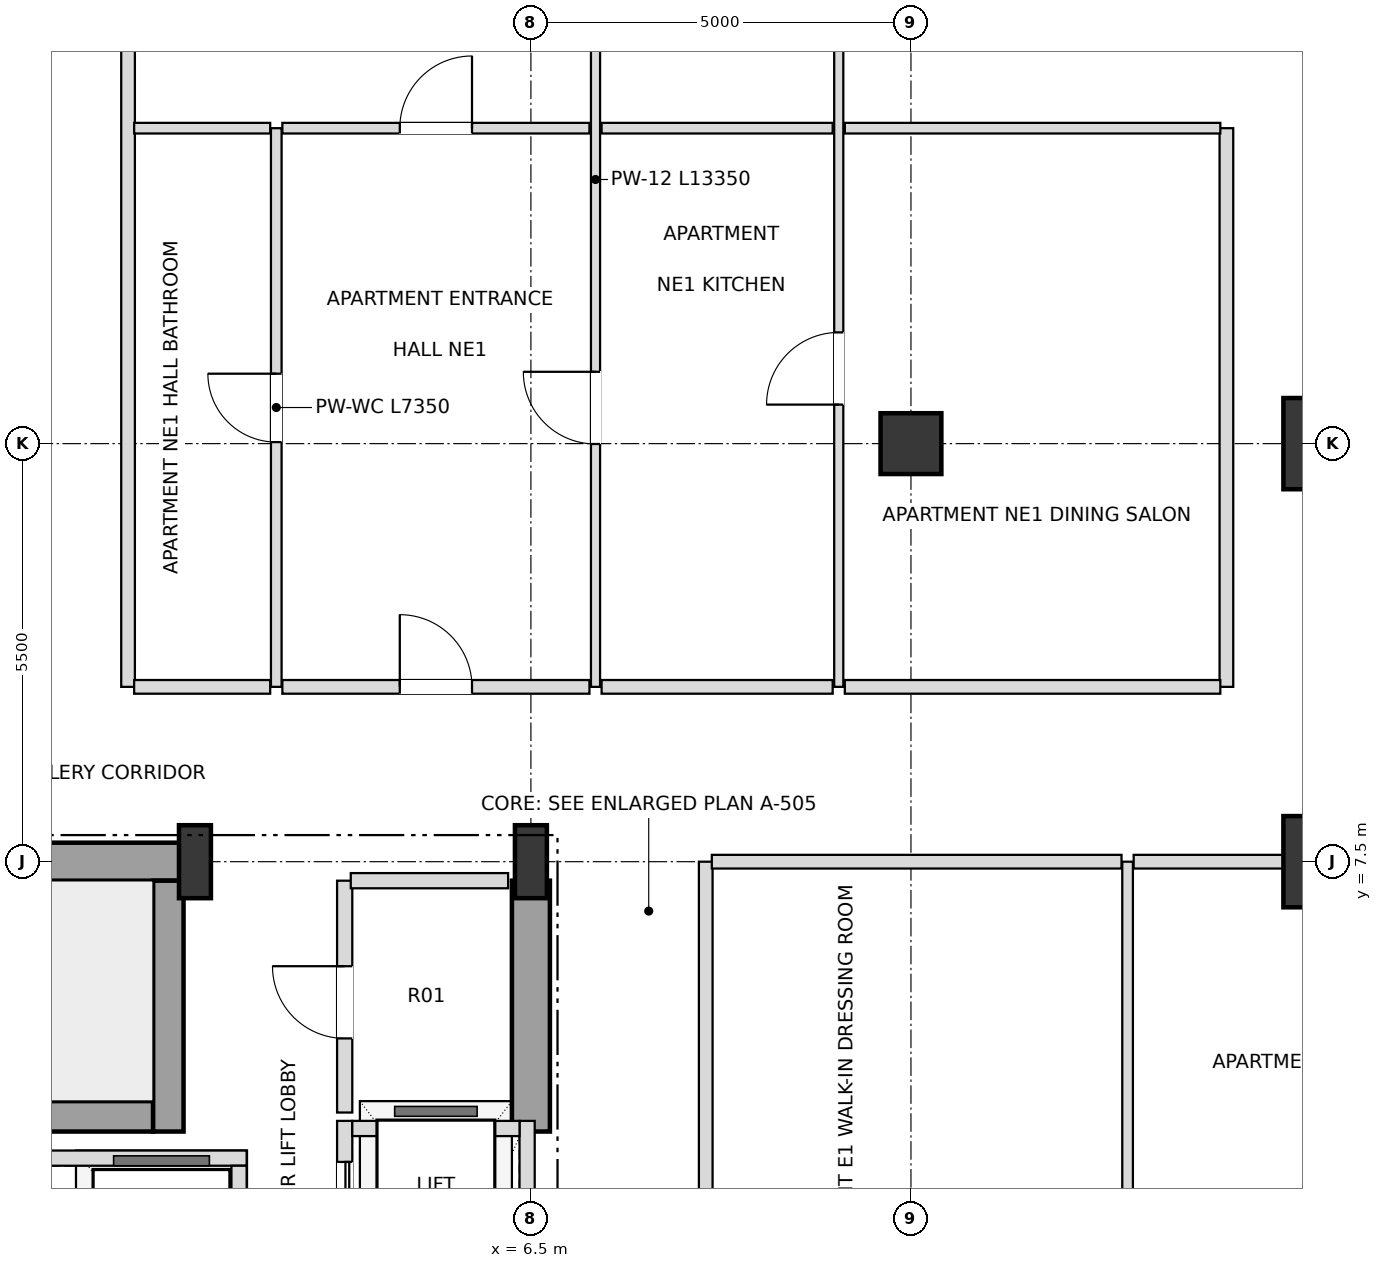
"""IFC4 building model, lengths in metres.
Left out: names, types, materials, properties, quantities, classifications, styles, units other than length and angle.
Written with IfcOpenShell. Run it as: python <this file> out.ifc"""

import sys

from ifc_helpers import new_model, si_unit, direction, frame, frame_2d, origin, origin_2d, place, context, subcontext, project, spatial, rectangle, i_section, extrude, element, fill, save


model = new_model("IFC4")
c1 = context("Model", 3, precision=1e-05, world=origin(), true_north=direction((0.0, 1.0)))
c2 = subcontext(c1, "Body", "Model", "MODEL_VIEW")
j1 = project(units=[si_unit("LENGTHUNIT", "METRE"), si_unit("PLANEANGLEUNIT", "RADIAN")], contexts=[c1])
p1 = place(None, origin())
s1 = spatial("IfcSite", under=j1, at=p1, CompositionType="ELEMENT")
p2 = place(p1, origin())
s2 = spatial("IfcBuilding", under=s1, at=p2, CompositionType="ELEMENT")
p3 = place(p2, frame((0.0, 0.0, 154.8)))
s3 = spatial("IfcBuildingStorey", under=s2, at=p3, CompositionType="ELEMENT", Elevation=154.8)
for number, where, z_axis, x_axis in (
    (1, (2.08, 7.5, 0.0), (0.0, 0.0, 1.0), (1.0, 0.0, 0.0)),
    (2, (6.5, 7.5, 0.0), (0.0, 0.0, 1.0), (1.0, 0.0, 0.0)),
):
    element("IfcColumn", number, at=place(p3, frame(where, z_axis=z_axis, x_axis=x_axis)), inside=s3, PredefinedType="COLUMN", context=c2, shape_type="SweptSolid", body=[
        extrude(i_section(OverallWidth=0.42, OverallDepth=0.96, WebThickness=0.022, FlangeThickness=0.034, at=origin_2d()), origin(), (0.0, 0.0, 1.0), 3.6),
    ])
for number, where, z_axis, x_axis in (
    (3, (17.0, 7.5, 0.0), (0.0, 0.0, 1.0), (1.0, 0.0, 0.0)),
    (4, (17.0, 13.0, 0.0), (0.0, 0.0, 1.0), (1.0, 0.0, 0.0)),
):
    element("IfcColumn", number, at=place(p3, frame(where, z_axis=z_axis, x_axis=x_axis)), inside=s3, PredefinedType="USERDEFINED", context=c2, shape_type="SweptSolid", body=[
        extrude(rectangle(XDim=1.2, YDim=1.2, at=origin_2d()), origin(), (0.0, 0.0, 1.0), 3.6),
    ])
p4 = place(p3, frame((11.5, 13.0, 0.0), z_axis=(0.0, 0.0, 1.0), x_axis=(1.0, 0.0, 0.0)))
e5 = element("IfcColumn", 5, at=p4, inside=s3, PredefinedType="COLUMN", context=c2, shape_type="SweptSolid", body=[
    extrude(rectangle(XDim=0.8, YDim=0.8, at=origin_2d()), origin(), (0.0, 0.0, 1.0), 3.6),
])
p5 = place(p3, frame((0.0, 7.5, 0.0), z_axis=(0.0, 0.0, 1.0), x_axis=(1.0, 0.0, 0.0)))
e6 = element("IfcWall", 6, at=p5, inside=s3, PredefinedType="SHEAR", context=c2, shape_type="SweptSolid", body=[
    extrude(rectangle(XDim=2.08, YDim=0.5, at=frame_2d((1.04, 0.0))), origin(), (0.0, 0.0, 1.0), 3.38),
])
p6 = place(p3, frame((6.5, 3.95, 0.0), z_axis=(0.0, 0.0, 1.0), x_axis=(0.0, 1.0, 0.0)))
e7 = element("IfcWall", 7, at=p6, inside=s3, PredefinedType="SHEAR", context=c2, shape_type="SweptSolid", body=[
    extrude(rectangle(XDim=3.3, YDim=0.5, at=frame_2d((1.65, 0.0))), origin(), (0.0, 0.0, 1.0), 3.38),
])
p7 = place(p3, frame((-5.55, 4.15, 0.0), z_axis=(0.0, 0.0, 1.0), x_axis=(1.0, 0.0, 0.0)))
e8 = element("IfcWall", 8, at=p7, inside=s3, PredefinedType="SHEAR", context=c2, shape_type="SweptSolid", body=[
    extrude(rectangle(XDim=7.08, YDim=0.4, at=frame_2d((3.54, 0.0))), origin(), (0.0, 0.0, 1.0), 3.38),
])
p8 = place(p3, frame((1.73, 3.95, 0.0), z_axis=(0.0, 0.0, 1.0), x_axis=(0.0, 1.0, 0.0)))
e9 = element("IfcWall", 9, at=p8, inside=s3, PredefinedType="SHEAR", context=c2, shape_type="SweptSolid", body=[
    extrude(rectangle(XDim=3.3, YDim=0.4, at=frame_2d((1.65, 0.0))), origin(), (0.0, 0.0, 1.0), 3.38),
])
p9 = place(p3, frame((4.05, -1.49, 0.0), z_axis=(0.0, 0.0, 1.0), x_axis=(0.0, 1.0, 0.0)))
e10 = element("IfcWall", 10, at=p9, inside=s3, PredefinedType="SOLIDWALL", context=c2, shape_type="SweptSolid", body=[
    extrude(rectangle(XDim=5.58, YDim=0.2, at=frame_2d((2.79, 0.0))), origin(), (0.0, 0.0, 1.0), 3.38),
])
p10 = place(p9, frame((0.54, 0.0, 0.0)))
e11 = element("IfcOpeningElement", 11, at=p10, cuts=e10, PredefinedType="OPENING", context=c2, shape_type="SweptSolid", body=[
    extrude(rectangle(XDim=1.1, YDim=2.15, at=frame_2d((0.55, 1.075))), frame((0.0, 0.11, 0.0), z_axis=(0.0, -1.0, 0.0), x_axis=(1.0, 0.0, 0.0)), (0.0, 0.0, 1.0), 0.22),
])
p11 = place(p9, frame((2.24, 0.0, 0.0)))
e12 = element("IfcOpeningElement", 12, at=p11, cuts=e10, PredefinedType="OPENING", context=c2, shape_type="SweptSolid", body=[
    extrude(rectangle(XDim=1.1, YDim=2.15, at=frame_2d((0.55, 1.075))), frame((0.0, 0.11, 0.0), z_axis=(0.0, -1.0, 0.0), x_axis=(1.0, 0.0, 0.0)), (0.0, 0.0, 1.0), 0.22),
])
p12 = place(p9, frame((3.94, 0.0, 0.0)))
e13 = element("IfcOpeningElement", 13, at=p12, cuts=e10, PredefinedType="OPENING", context=c2, shape_type="SweptSolid", body=[
    extrude(rectangle(XDim=1.1, YDim=2.15, at=frame_2d((0.55, 1.075))), frame((0.0, 0.11, 0.0), z_axis=(0.0, -1.0, 0.0), x_axis=(1.0, 0.0, 0.0)), (0.0, 0.0, 1.0), 0.22),
])
p13 = place(p3, frame((6.45, -1.49, 0.0), z_axis=(0.0, 0.0, 1.0), x_axis=(0.0, 1.0, 0.0)))
e14 = element("IfcWall", 14, at=p13, inside=s3, PredefinedType="SOLIDWALL", context=c2, shape_type="SweptSolid", body=[
    extrude(rectangle(XDim=5.58, YDim=0.2, at=frame_2d((2.79, 0.0))), origin(), (0.0, 0.0, 1.0), 2.816),
])
p14 = place(p3, frame((4.15, 3.99, 0.0), z_axis=(0.0, 0.0, 1.0), x_axis=(1.0, 0.0, 0.0)))
e15 = element("IfcWall", 15, at=p14, inside=s3, PredefinedType="SOLIDWALL", context=c2, shape_type="SweptSolid", body=[
    extrude(rectangle(XDim=2.2, YDim=0.2, at=frame_2d((1.1, 0.0))), origin(), (0.0, 0.0, 1.0), 3.38),
])
p15 = place(p3, frame((-2.82, 3.6, 0.0), z_axis=(0.0, 0.0, 1.0), x_axis=(1.0, 0.0, 0.0)))
e16 = element("IfcWall", 16, at=p15, inside=s3, PredefinedType="SOLIDWALL", context=c2, shape_type="SweptSolid", body=[
    extrude(rectangle(XDim=5.58, YDim=0.2, at=frame_2d((2.79, 0.0))), origin(), (0.0, 0.0, 1.0), 3.38),
])
p16 = place(p3, frame((2.66, 1.0, 0.0), z_axis=(0.0, 0.0, 1.0), x_axis=(0.0, 1.0, 0.0)))
e17 = element("IfcWall", 17, at=p16, inside=s3, PredefinedType="SOLIDWALL", context=c2, shape_type="SweptSolid", body=[
    extrude(rectangle(XDim=2.5, YDim=0.2, at=frame_2d((1.25, 0.0))), origin(), (0.0, 0.0, 1.0), 3.38),
])
p17 = place(p3, frame((1.2, 9.8, 0.0), z_axis=(0.0, 0.0, 1.0), x_axis=(0.0, 1.0, 0.0)))
e18 = element("IfcWall", 18, at=p17, inside=s3, PredefinedType="PARTITIONING", context=c2, shape_type="SweptSolid", body=[
    extrude(rectangle(XDim=13.35, YDim=0.18, at=frame_2d((6.675, 0.0))), origin(), (0.0, 0.0, 1.0), 2.816),
])
p18 = place(p3, frame((3.15, 9.8, 0.0), z_axis=(0.0, 0.0, 1.0), x_axis=(0.0, 1.0, 0.0)))
e19 = element("IfcWall", 19, at=p18, inside=s3, PredefinedType="PARTITIONING", context=c2, shape_type="SweptSolid", body=[
    extrude(rectangle(XDim=7.35, YDim=0.14, at=frame_2d((3.675, 0.0))), origin(), (0.0, 0.0, 1.0), 3.38),
])
p19 = place(p18, frame((3.22, 0.0, 0.0)))
e20 = element("IfcOpeningElement", 20, at=p19, cuts=e19, PredefinedType="OPENING", context=c2, shape_type="SweptSolid", body=[
    extrude(rectangle(XDim=0.9, YDim=2.1, at=frame_2d((0.45, 1.05))), frame((0.0, 0.08, 0.0), z_axis=(0.0, -1.0, 0.0), x_axis=(1.0, 0.0, 0.0)), (0.0, 0.0, 1.0), 0.16),
])
p20 = place(p3, frame((4.05, 4.2, 0.0), z_axis=(0.0, 0.0, 1.0), x_axis=(0.0, 1.0, 0.0)))
e21 = element("IfcWall", 21, at=p20, inside=s3, PredefinedType="SOLIDWALL", context=c2, shape_type="SweptSolid", body=[
    extrude(rectangle(XDim=3.05, YDim=0.2, at=frame_2d((1.525, 0.0))), origin(), (0.0, 0.0, 1.0), 3.38),
])
p21 = place(p20, frame((0.975, 0.0, 0.0)))
e22 = element("IfcOpeningElement", 22, at=p21, cuts=e21, PredefinedType="OPENING", context=c2, shape_type="SweptSolid", body=[
    extrude(rectangle(XDim=0.95, YDim=2.15, at=frame_2d((0.475, 1.075))), frame((0.0, 0.11, 0.0), z_axis=(0.0, -1.0, 0.0), x_axis=(1.0, 0.0, 0.0)), (0.0, 0.0, 1.0), 0.22),
])
p22 = place(p3, frame((7.35, 9.8, 0.0), z_axis=(0.0, 0.0, 1.0), x_axis=(0.0, 1.0, 0.0)))
e23 = element("IfcWall", 23, at=p22, inside=s3, PredefinedType="PARTITIONING", context=c2, shape_type="SweptSolid", body=[
    extrude(rectangle(XDim=13.35, YDim=0.12, at=frame_2d((6.675, 0.0))), origin(), (0.0, 0.0, 1.0), 2.816),
])
p23 = place(p22, frame((3.195, 0.0, 0.0)))
e24 = element("IfcOpeningElement", 24, at=p23, cuts=e23, PredefinedType="OPENING", context=c2, shape_type="SweptSolid", body=[
    extrude(rectangle(XDim=0.95, YDim=2.1, at=frame_2d((0.475, 1.05))), frame((0.0, 0.07, 0.0), z_axis=(0.0, -1.0, 0.0), x_axis=(1.0, 0.0, 0.0)), (0.0, 0.0, 1.0), 0.14),
])
p24 = place(p22, frame((11.051, 0.0, 0.0)))
e25 = element("IfcOpeningElement", 25, at=p24, cuts=e23, PredefinedType="OPENING", context=c2, shape_type="SweptSolid", body=[
    extrude(rectangle(XDim=0.9, YDim=2.1, at=frame_2d((0.45, 1.05))), frame((0.0, 0.07, 0.0), z_axis=(0.0, -1.0, 0.0), x_axis=(1.0, 0.0, 0.0)), (0.0, 0.0, 1.0), 0.14),
])
p25 = place(p3, frame((8.8, -7.5, 0.0), z_axis=(0.0, 0.0, 1.0), x_axis=(0.0, 1.0, 0.0)))
e26 = element("IfcWall", 26, at=p25, inside=s3, PredefinedType="PARTITIONING", context=c2, shape_type="SweptSolid", body=[
    extrude(rectangle(XDim=15.0, YDim=0.18, at=frame_2d((7.5, 0.0))), origin(), (0.0, 0.0, 1.0), 3.38),
])
p26 = place(p25, frame((3.475, 0.0, 0.0)))
e27 = element("IfcOpeningElement", 27, at=p26, cuts=e26, PredefinedType="OPENING", context=c2, shape_type="SweptSolid", body=[
    extrude(rectangle(XDim=0.95, YDim=2.15, at=frame_2d((0.475, 1.075))), frame((0.0, 0.1, 0.0), z_axis=(0.0, -1.0, 0.0), x_axis=(1.0, 0.0, 0.0)), (0.0, 0.0, 1.0), 0.2),
])
p27 = place(p3, frame((10.55, 9.8, 0.0), z_axis=(0.0, 0.0, 1.0), x_axis=(0.0, 1.0, 0.0)))
e28 = element("IfcWall", 28, at=p27, inside=s3, PredefinedType="PARTITIONING", context=c2, shape_type="SweptSolid", body=[
    extrude(rectangle(XDim=13.35, YDim=0.12, at=frame_2d((6.675, 0.0))), origin(), (0.0, 0.0, 1.0), 2.816),
])
p28 = place(p27, frame((3.713, 0.0, 0.0)))
e29 = element("IfcOpeningElement", 29, at=p28, cuts=e28, PredefinedType="OPENING", context=c2, shape_type="SweptSolid", body=[
    extrude(rectangle(XDim=0.95, YDim=2.1, at=frame_2d((0.475, 1.05))), frame((0.0, 0.07, 0.0), z_axis=(0.0, -1.0, 0.0), x_axis=(1.0, 0.0, 0.0)), (0.0, 0.0, 1.0), 0.14),
])
p29 = place(p27, frame((11.051, 0.0, 0.0)))
e30 = element("IfcOpeningElement", 30, at=p29, cuts=e28, PredefinedType="OPENING", context=c2, shape_type="SweptSolid", body=[
    extrude(rectangle(XDim=0.9, YDim=2.1, at=frame_2d((0.45, 1.05))), frame((0.0, 0.07, 0.0), z_axis=(0.0, -1.0, 0.0), x_axis=(1.0, 0.0, 0.0)), (0.0, 0.0, 1.0), 0.14),
])
p30 = place(p3, frame((14.35, -7.5, 0.0), z_axis=(0.0, 0.0, 1.0), x_axis=(0.0, 1.0, 0.0)))
e31 = element("IfcWall", 31, at=p30, inside=s3, PredefinedType="PARTITIONING", context=c2, shape_type="SweptSolid", body=[
    extrude(rectangle(XDim=15.0, YDim=0.14, at=frame_2d((7.5, 0.0))), origin(), (0.0, 0.0, 1.0), 3.38),
])
p31 = place(p30, frame((3.475, 0.0, 0.0)))
e32 = element("IfcOpeningElement", 32, at=p31, cuts=e31, PredefinedType="OPENING", context=c2, shape_type="SweptSolid", body=[
    extrude(rectangle(XDim=0.95, YDim=2.1, at=frame_2d((0.475, 1.05))), frame((0.0, 0.08, 0.0), z_axis=(0.0, -1.0, 0.0), x_axis=(1.0, 0.0, 0.0)), (0.0, 0.0, 1.0), 0.16),
])
p32 = place(p3, frame((15.65, 9.8, 0.0), z_axis=(0.0, 0.0, 1.0), x_axis=(0.0, 1.0, 0.0)))
e33 = element("IfcWall", 33, at=p32, inside=s3, PredefinedType="PARTITIONING", context=c2, shape_type="SweptSolid", body=[
    extrude(rectangle(XDim=7.35, YDim=0.18, at=frame_2d((3.675, 0.0))), origin(), (0.0, 0.0, 1.0), 2.736),
])
p33 = place(p3, frame((4.13, 7.25, 0.0), z_axis=(0.0, 0.0, 1.0), x_axis=(1.0, 0.0, 0.0)))
e34 = element("IfcWall", 34, at=p33, inside=s3, PredefinedType="SOLIDWALL", context=c2, shape_type="SweptSolid", body=[
    extrude(rectangle(XDim=2.07, YDim=0.2, at=frame_2d((1.035, 0.0))), origin(), (0.0, 0.0, 1.0), 3.38),
])
p34 = place(p3, frame((8.88, 7.5, 0.0), z_axis=(0.0, 0.0, 1.0), x_axis=(1.0, 0.0, 0.0)))
e35 = element("IfcWall", 35, at=p34, inside=s3, PredefinedType="PARTITIONING", context=c2, shape_type="SweptSolid", body=[
    extrude(rectangle(XDim=5.39, YDim=0.18, at=frame_2d((2.695, 0.0))), origin(), (0.0, 0.0, 1.0), 2.816),
])
p35 = place(p3, frame((14.43, 7.5, 0.0), z_axis=(0.0, 0.0, 1.0), x_axis=(1.0, 0.0, 0.0)))
e36 = element("IfcWall", 36, at=p35, inside=s3, PredefinedType="PARTITIONING", context=c2, shape_type="SweptSolid", body=[
    extrude(rectangle(XDim=5.72, YDim=0.18, at=frame_2d((2.86, 0.0))), origin(), (0.0, 0.0, 1.0), 2.816),
])
p36 = place(p3, frame((1.28, 9.8, 0.0), z_axis=(0.0, 0.0, 1.0), x_axis=(1.0, 0.0, 0.0)))
e37 = element("IfcWall", 37, at=p36, inside=s3, PredefinedType="PARTITIONING", context=c2, shape_type="SweptSolid", body=[
    extrude(rectangle(XDim=1.79, YDim=0.18, at=frame_2d((0.895, 0.0))), origin(), (0.0, 0.0, 1.0), 3.38),
])
p37 = place(p3, frame((3.23, 9.8, 0.0), z_axis=(0.0, 0.0, 1.0), x_axis=(1.0, 0.0, 0.0)))
e38 = element("IfcWall", 38, at=p37, inside=s3, PredefinedType="PARTITIONING", context=c2, shape_type="SweptSolid", body=[
    extrude(rectangle(XDim=4.04, YDim=0.18, at=frame_2d((2.02, 0.0))), origin(), (0.0, 0.0, 1.0), 2.816),
])
p38 = place(p37, frame((1.545, 0.0, 0.0)))
e39 = element("IfcOpeningElement", 39, at=p38, cuts=e38, PredefinedType="OPENING", context=c2, shape_type="SweptSolid", body=[
    extrude(rectangle(XDim=0.95, YDim=2.15, at=frame_2d((0.475, 1.075))), frame((0.0, 0.1, 0.0), z_axis=(0.0, -1.0, 0.0), x_axis=(1.0, 0.0, 0.0)), (0.0, 0.0, 1.0), 0.2),
])
p39 = place(p3, frame((7.43, 9.8, 0.0), z_axis=(0.0, 0.0, 1.0), x_axis=(1.0, 0.0, 0.0)))
e40 = element("IfcWall", 40, at=p39, inside=s3, PredefinedType="PARTITIONING", context=c2, shape_type="SweptSolid", body=[
    extrude(rectangle(XDim=3.04, YDim=0.18, at=frame_2d((1.52, 0.0))), origin(), (0.0, 0.0, 1.0), 3.38),
])
p40 = place(p3, frame((10.63, 9.8, 0.0), z_axis=(0.0, 0.0, 1.0), x_axis=(1.0, 0.0, 0.0)))
e41 = element("IfcWall", 41, at=p40, inside=s3, PredefinedType="PARTITIONING", context=c2, shape_type="SweptSolid", body=[
    extrude(rectangle(XDim=4.94, YDim=0.18, at=frame_2d((2.47, 0.0))), origin(), (0.0, 0.0, 1.0), 3.38),
])
p41 = place(p3, frame((1.28, 17.15, 0.0), z_axis=(0.0, 0.0, 1.0), x_axis=(1.0, 0.0, 0.0)))
e42 = element("IfcWall", 42, at=p41, inside=s3, PredefinedType="PARTITIONING", context=c2, shape_type="SweptSolid", body=[
    extrude(rectangle(XDim=1.79, YDim=0.14, at=frame_2d((0.895, 0.0))), origin(), (0.0, 0.0, 1.0), 3.38),
])
p42 = place(p3, frame((3.23, 17.15, 0.0), z_axis=(0.0, 0.0, 1.0), x_axis=(1.0, 0.0, 0.0)))
e43 = element("IfcWall", 43, at=p42, inside=s3, PredefinedType="PARTITIONING", context=c2, shape_type="SweptSolid", body=[
    extrude(rectangle(XDim=4.04, YDim=0.14, at=frame_2d((2.02, 0.0))), origin(), (0.0, 0.0, 1.0), 2.816),
])
p43 = place(p42, frame((1.545, 0.0, 0.0)))
e44 = element("IfcOpeningElement", 44, at=p43, cuts=e43, PredefinedType="OPENING", context=c2, shape_type="SweptSolid", body=[
    extrude(rectangle(XDim=0.95, YDim=2.1, at=frame_2d((0.475, 1.05))), frame((0.0, 0.08, 0.0), z_axis=(0.0, -1.0, 0.0), x_axis=(1.0, 0.0, 0.0)), (0.0, 0.0, 1.0), 0.16),
])
p44 = place(p3, frame((7.43, 17.15, 0.0), z_axis=(0.0, 0.0, 1.0), x_axis=(1.0, 0.0, 0.0)))
e45 = element("IfcWall", 45, at=p44, inside=s3, PredefinedType="PARTITIONING", context=c2, shape_type="SweptSolid", body=[
    extrude(rectangle(XDim=3.04, YDim=0.14, at=frame_2d((1.52, 0.0))), origin(), (0.0, 0.0, 1.0), 3.38),
])
p45 = place(p3, frame((10.63, 17.15, 0.0), z_axis=(0.0, 0.0, 1.0), x_axis=(1.0, 0.0, 0.0)))
e46 = element("IfcWall", 46, at=p45, inside=s3, PredefinedType="PARTITIONING", context=c2, shape_type="SweptSolid", body=[
    extrude(rectangle(XDim=4.94, YDim=0.14, at=frame_2d((2.47, 0.0))), origin(), (0.0, 0.0, 1.0), 2.736),
])
p46 = place(p12, origin())
e47 = element("IfcDoor", 47, at=p46, inside=s3, OperationType="DOUBLE_DOOR_SLIDING", PredefinedType="DOOR", context=c2, shape_type="SweptSolid", body=[
    extrude(rectangle(XDim=1.1, YDim=2.15, at=frame_2d((0.55, 1.075))), frame((0.0, 0.025, 0.0), z_axis=(0.0, -1.0, 0.0), x_axis=(1.0, 0.0, 0.0)), (0.0, 0.0, 1.0), 0.05),
])
fill(e13, e47)
p47 = place(p21, origin())
e48 = element("IfcDoor", 48, at=p47, inside=s3, OperationType="SINGLE_SWING_RIGHT", PredefinedType="DOOR", context=c2, shape_type="SweptSolid", body=[
    extrude(rectangle(XDim=0.95, YDim=2.15, at=frame_2d((0.475, 1.075))), frame((0.0, 0.025, 0.0), z_axis=(0.0, -1.0, 0.0), x_axis=(1.0, 0.0, 0.0)), (0.0, 0.0, 1.0), 0.05),
])
fill(e22, e48)
p48 = place(p19, origin())
e49 = element("IfcDoor", 49, at=p48, inside=s3, OperationType="SINGLE_SWING_RIGHT", PredefinedType="DOOR", context=c2, shape_type="SweptSolid", body=[
    extrude(rectangle(XDim=0.9, YDim=2.1, at=frame_2d((0.45, 1.05))), frame((0.0, 0.025, 0.0), z_axis=(0.0, -1.0, 0.0), x_axis=(1.0, 0.0, 0.0)), (0.0, 0.0, 1.0), 0.05),
])
fill(e20, e49)
p49 = place(p38, origin())
e50 = element("IfcDoor", 50, at=p49, inside=s3, OperationType="SINGLE_SWING_LEFT", PredefinedType="DOOR", context=c2, shape_type="SweptSolid", body=[
    extrude(rectangle(XDim=0.95, YDim=2.15, at=frame_2d((0.475, 1.075))), frame((0.0, 0.025, 0.0), z_axis=(0.0, -1.0, 0.0), x_axis=(1.0, 0.0, 0.0)), (0.0, 0.0, 1.0), 0.05),
])
fill(e39, e50)
p50 = place(p23, origin())
e51 = element("IfcDoor", 51, at=p50, inside=s3, OperationType="SINGLE_SWING_RIGHT", PredefinedType="DOOR", context=c2, shape_type="SweptSolid", body=[
    extrude(rectangle(XDim=0.95, YDim=2.1, at=frame_2d((0.475, 1.05))), frame((0.0, 0.025, 0.0), z_axis=(0.0, -1.0, 0.0), x_axis=(1.0, 0.0, 0.0)), (0.0, 0.0, 1.0), 0.05),
])
fill(e24, e51)
p51 = place(p28, origin())
e52 = element("IfcDoor", 52, at=p51, inside=s3, OperationType="SINGLE_SWING_LEFT", PredefinedType="DOOR", context=c2, shape_type="SweptSolid", body=[
    extrude(rectangle(XDim=0.95, YDim=2.1, at=frame_2d((0.475, 1.05))), frame((0.0, 0.025, 0.0), z_axis=(0.0, -1.0, 0.0), x_axis=(1.0, 0.0, 0.0)), (0.0, 0.0, 1.0), 0.05),
])
fill(e29, e52)
p52 = place(p43, origin())
e53 = element("IfcDoor", 53, at=p52, inside=s3, OperationType="SINGLE_SWING_RIGHT", PredefinedType="DOOR", context=c2, shape_type="SweptSolid", body=[
    extrude(rectangle(XDim=0.95, YDim=2.1, at=frame_2d((0.475, 1.05))), frame((0.0, 0.025, 0.0), z_axis=(0.0, -1.0, 0.0), x_axis=(1.0, 0.0, 0.0)), (0.0, 0.0, 1.0), 0.05),
])
fill(e44, e53)
save(model, sys.argv[1])
